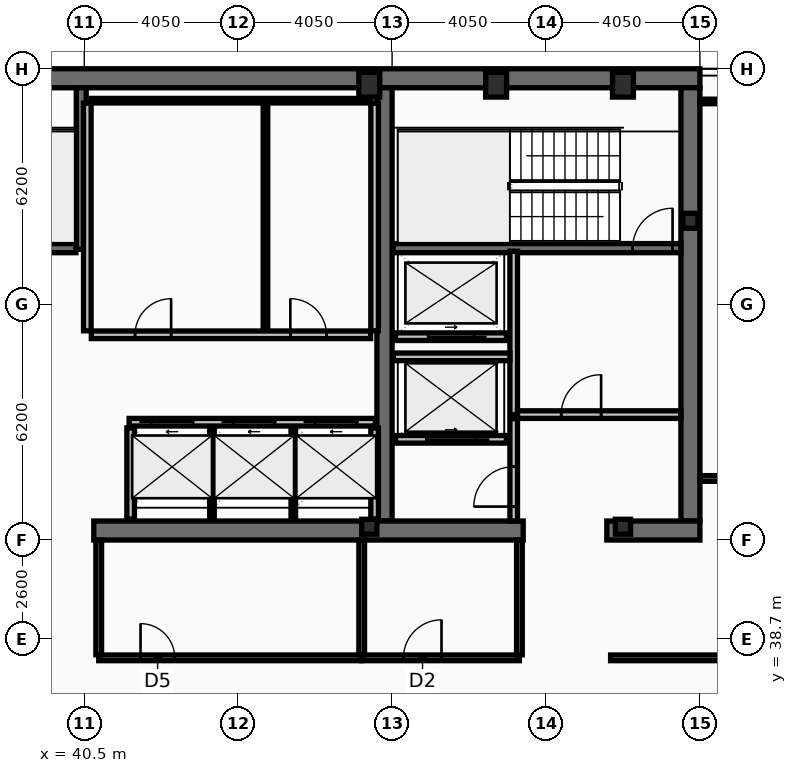
"""IFC4 building model, lengths in metres.
Left out: names, types, materials, properties, quantities, classifications, styles, units other than length and angle.
Written with IfcOpenShell. Run it as: python <this file> out.ifc"""

import sys

from ifc_helpers import new_model, si_unit, direction, frame, frame_2d, origin, origin_2d, place, context, subcontext, project, spatial, rectangle, hollow_rectangle, i_section, extrude, element, fill, save


model = new_model("IFC4")
c1 = context("Model", 3, precision=1e-05, world=origin(), true_north=direction((0.0, 1.0)))
c2 = subcontext(c1, "Body", "Model", "MODEL_VIEW")
j1 = project(units=[si_unit("LENGTHUNIT", "METRE"), si_unit("PLANEANGLEUNIT", "RADIAN")], contexts=[c1])
p1 = place(None, origin())
s1 = spatial("IfcSite", under=j1, at=p1, CompositionType="ELEMENT")
p2 = place(p1, origin())
s2 = spatial("IfcBuilding", under=s1, at=p2, CompositionType="ELEMENT")
p3 = place(p2, frame((0.0, 0.0, 329.0)))
s3 = spatial("IfcBuildingStorey", under=s2, at=p3, CompositionType="ELEMENT", Elevation=329.0)
p4 = place(p3, frame((16.2, 53.45, 0.0), z_axis=(0.0, 0.0, 1.0), x_axis=(1.0, 0.0, 0.0)))
e1 = element("IfcWall", 1, at=p4, inside=s3, PredefinedType="SHEAR", context=c2, shape_type="SweptSolid", body=[
    extrude(rectangle(XDim=40.5, YDim=0.5, at=frame_2d((20.25, 0.0))), origin(), (0.0, 0.0, 1.0), 3.44),
])
p5 = place(p3, frame((56.45, 53.2, 0.0), z_axis=(0.0, 0.0, 1.0), x_axis=(0.0, -1.0, 0.0)))
e2 = element("IfcWall", 2, at=p5, inside=s3, PredefinedType="SHEAR", context=c2, shape_type="SweptSolid", body=[
    extrude(rectangle(XDim=11.4, YDim=0.5, at=frame_2d((5.7, 0.0))), origin(), (0.0, 0.0, 1.0), 3.44),
])
p6 = place(p3, frame((48.4, 41.8, 0.0), z_axis=(0.0, 0.0, 1.0), x_axis=(0.0, 1.0, 0.0)))
e3 = element("IfcWall", 3, at=p6, inside=s3, PredefinedType="SHEAR", context=c2, shape_type="SweptSolid", body=[
    extrude(rectangle(XDim=11.4, YDim=0.4, at=frame_2d((5.7, 0.0))), origin(), (0.0, 0.0, 1.0), 3.44),
])
p7 = place(p3, frame((52.05, 41.55, 0.0), z_axis=(0.0, 0.0, 1.0), x_axis=(-1.0, 0.0, 0.0)))
e4 = element("IfcWall", 4, at=p7, inside=s3, PredefinedType="SHEAR", context=c2, shape_type="SweptSolid", body=[
    extrude(rectangle(XDim=11.3, YDim=0.5, at=frame_2d((5.65, 0.0))), origin(), (0.0, 0.0, 1.0), 3.44),
])
p8 = place(p3, frame((56.7, 41.55, 0.0), z_axis=(0.0, 0.0, 1.0), x_axis=(-1.0, 0.0, 0.0)))
e5 = element("IfcWall", 5, at=p8, inside=s3, PredefinedType="SHEAR", context=c2, shape_type="SweptSolid", body=[
    extrude(rectangle(XDim=2.45, YDim=0.5, at=frame_2d((1.225, 0.0))), origin(), (0.0, 0.0, 1.0), 3.44),
])
p9 = place(p3, frame((40.42, 48.95, 0.0), z_axis=(0.0, 0.0, 1.0), x_axis=(0.0, 1.0, 0.0)))
e6 = element("IfcWall", 6, at=p9, inside=s3, PredefinedType="SHEAR", context=c2, shape_type="SweptSolid", body=[
    extrude(rectangle(XDim=4.25, YDim=0.26, at=frame_2d((2.125, 0.0))), origin(), (0.0, 0.0, 1.0), 3.44),
])
p10 = place(p3, frame((48.63, 48.98, 0.0), z_axis=(0.0, 0.0, 1.0), x_axis=(1.0, 0.0, 0.0)))
e7 = element("IfcWall", 7, at=p10, inside=s3, PredefinedType="SHEAR", context=c2, shape_type="SweptSolid", body=[
    extrude(rectangle(XDim=7.57, YDim=0.24, at=frame_2d((3.785, 0.0))), origin(), (0.0, 0.0, 1.0), 3.44),
])
p11 = place(p10, frame((6.3, 0.0, 0.0)))
e8 = element("IfcOpeningElement", 8, at=p11, cuts=e7, PredefinedType="OPENING", context=c2, shape_type="SweptSolid", body=[
    extrude(rectangle(XDim=1.05, YDim=2.15, at=frame_2d((0.525, 1.075))), frame((0.0, 0.13, 0.0), z_axis=(0.0, -1.0, 0.0), x_axis=(1.0, 0.0, 0.0)), (0.0, 0.0, 1.0), 0.26),
])
p12 = place(p3, frame((32.72, 48.98, 0.0), z_axis=(0.0, 0.0, 1.0), x_axis=(1.0, 0.0, 0.0)))
e9 = element("IfcWall", 9, at=p12, inside=s3, PredefinedType="SHEAR", context=c2, shape_type="SweptSolid", body=[
    extrude(rectangle(XDim=7.56, YDim=0.24, at=frame_2d((3.78, 0.0))), origin(), (0.0, 0.0, 1.0), 3.44),
])
p13 = place(p12, frame((0.22, 0.0, 0.0)))
e10 = element("IfcOpeningElement", 10, at=p13, cuts=e9, PredefinedType="OPENING", context=c2, shape_type="SweptSolid", body=[
    extrude(rectangle(XDim=1.05, YDim=2.15, at=frame_2d((0.525, 1.075))), frame((0.0, 0.13, 0.0), z_axis=(0.0, -1.0, 0.0), x_axis=(1.0, 0.0, 0.0)), (0.0, 0.0, 1.0), 0.26),
])
for number, where, z_axis, x_axis in (
    (11, (48.0, 53.28, 0.0), (0.0, 0.0, 1.0), (1.0, 0.0, 0.0)),
    (12, (51.337, 53.28, 0.0), (0.0, 0.0, 1.0), (1.0, 0.0, 0.0)),
    (13, (54.675, 53.28, 0.0), (0.0, 0.0, 1.0), (1.0, 0.0, 0.0)),
):
    element("IfcColumn", number, at=place(p3, frame(where, z_axis=z_axis, x_axis=x_axis)), inside=s3, PredefinedType="COLUMN", context=c2, shape_type="SweptSolid", body=[
        extrude(hollow_rectangle(XDim=0.55, YDim=0.65, WallThickness=0.04, at=origin_2d()), origin(), (0.0, 0.0, 1.0), 3.6),
    ])
for number, where, z_axis, x_axis in (
    (14, (56.45, 49.7, 0.0), (0.0, 0.0, 1.0), (1.0, 0.0, 0.0)),
    (15, (48.0, 41.65, 0.0), (0.0, 0.0, 1.0), (1.0, 0.0, 0.0)),
    (16, (54.675, 41.65, 0.0), (0.0, 0.0, 1.0), (1.0, 0.0, 0.0)),
):
    element("IfcColumn", number, at=place(p3, frame(where, z_axis=z_axis, x_axis=x_axis)), inside=s3, PredefinedType="COLUMN", context=c2, shape_type="SweptSolid", body=[
        extrude(i_section(OverallWidth=0.399, OverallDepth=0.393, WebThickness=0.023, FlangeThickness=0.037, at=origin_2d()), origin(), (0.0, 0.0, 1.0), 3.6),
    ])
p14 = place(p3, frame((41.68, 44.4, 0.0), z_axis=(0.0, 0.0, 1.0), x_axis=(1.0, 0.0, 0.0)))
e17 = element("IfcWall", 17, at=p14, inside=s3, PredefinedType="PARTITIONING", context=c2, shape_type="SweptSolid", body=[
    extrude(rectangle(XDim=6.48, YDim=0.2, at=frame_2d((3.24, 0.0))), origin(), (0.0, 0.0, 1.0), 3.44),
])
p15 = place(p14, frame((0.58, 0.0, 0.0)))
e18 = element("IfcOpeningElement", 18, at=p15, cuts=e17, PredefinedType="OPENING", context=c2, shape_type="SweptSolid", body=[
    extrude(rectangle(XDim=1.1, YDim=2.18, at=frame_2d((0.55, 1.09))), frame((0.0, 0.11, 0.0), z_axis=(0.0, -1.0, 0.0), x_axis=(1.0, 0.0, 0.0)), (0.0, 0.0, 1.0), 0.22),
])
p16 = place(p14, frame((2.74, 0.0, 0.0)))
e19 = element("IfcOpeningElement", 19, at=p16, cuts=e17, PredefinedType="OPENING", context=c2, shape_type="SweptSolid", body=[
    extrude(rectangle(XDim=1.1, YDim=2.18, at=frame_2d((0.55, 1.09))), frame((0.0, 0.11, 0.0), z_axis=(0.0, -1.0, 0.0), x_axis=(1.0, 0.0, 0.0)), (0.0, 0.0, 1.0), 0.22),
])
p17 = place(p14, frame((4.9, 0.0, 0.0)))
e20 = element("IfcOpeningElement", 20, at=p17, cuts=e17, PredefinedType="OPENING", context=c2, shape_type="SweptSolid", body=[
    extrude(rectangle(XDim=1.1, YDim=2.18, at=frame_2d((0.55, 1.09))), frame((0.0, 0.11, 0.0), z_axis=(0.0, -1.0, 0.0), x_axis=(1.0, 0.0, 0.0)), (0.0, 0.0, 1.0), 0.22),
])
p18 = place(p3, frame((51.61, 43.95, 0.0), z_axis=(0.0, 0.0, 1.0), x_axis=(-1.0, 0.0, 0.0)))
e21 = element("IfcWall", 21, at=p18, inside=s3, PredefinedType="PARTITIONING", context=c2, shape_type="SweptSolid", body=[
    extrude(rectangle(XDim=2.92, YDim=0.2, at=frame_2d((1.46, 0.0))), origin(), (0.0, 0.0, 1.0), 3.44),
])
p19 = place(p18, frame((0.81, 0.0, 0.0)))
e22 = element("IfcOpeningElement", 22, at=p19, cuts=e21, PredefinedType="OPENING", context=c2, shape_type="SweptSolid", body=[
    extrude(rectangle(XDim=1.3, YDim=2.18, at=frame_2d((0.65, 1.09))), frame((0.0, 0.11, 0.0), z_axis=(0.0, -1.0, 0.0), x_axis=(1.0, 0.0, 0.0)), (0.0, 0.0, 1.0), 0.22),
])
p20 = place(p3, frame((51.61, 46.65, 0.0), z_axis=(0.0, 0.0, 1.0), x_axis=(-1.0, 0.0, 0.0)))
e23 = element("IfcWall", 23, at=p20, inside=s3, PredefinedType="PARTITIONING", context=c2, shape_type="SweptSolid", body=[
    extrude(rectangle(XDim=2.92, YDim=0.2, at=frame_2d((1.46, 0.0))), origin(), (0.0, 0.0, 1.0), 3.44),
])
p21 = place(p20, frame((0.86, 0.0, 0.0)))
e24 = element("IfcOpeningElement", 24, at=p21, cuts=e23, PredefinedType="OPENING", context=c2, shape_type="SweptSolid", body=[
    extrude(rectangle(XDim=1.2, YDim=2.18, at=frame_2d((0.6, 1.09))), frame((0.0, 0.11, 0.0), z_axis=(0.0, -1.0, 0.0), x_axis=(1.0, 0.0, 0.0)), (0.0, 0.0, 1.0), 0.22),
])
p22 = place(p3, frame((51.8, 44.6, 0.0), z_axis=(0.0, 0.0, 1.0), x_axis=(0.0, 1.0, 0.0)))
e25 = element("IfcWall", 25, at=p22, inside=s3, PredefinedType="PARTITIONING", context=c2, shape_type="SweptSolid", body=[
    extrude(rectangle(XDim=4.3, YDim=0.2, at=frame_2d((2.15, 0.0))), origin(), (0.0, 0.0, 1.0), 3.44),
])
p23 = place(p3, frame((51.9, 44.6, 0.0), z_axis=(0.0, 0.0, 1.0), x_axis=(1.0, 0.0, 0.0)))
e26 = element("IfcWall", 26, at=p23, inside=s3, PredefinedType="PARTITIONING", context=c2, shape_type="SweptSolid", body=[
    extrude(rectangle(XDim=4.3, YDim=0.2, at=frame_2d((2.15, 0.0))), origin(), (0.0, 0.0, 1.0), 3.44),
])
p24 = place(p23, frame((1.15, 0.0, 0.0)))
e27 = element("IfcOpeningElement", 27, at=p24, cuts=e26, PredefinedType="OPENING", context=c2, shape_type="SweptSolid", body=[
    extrude(rectangle(XDim=1.05, YDim=2.15, at=frame_2d((0.525, 1.075))), frame((0.0, 0.11, 0.0), z_axis=(0.0, -1.0, 0.0), x_axis=(1.0, 0.0, 0.0)), (0.0, 0.0, 1.0), 0.22),
])
p25 = place(p3, frame((48.63, 46.12, 0.0), z_axis=(0.0, 0.0, 1.0), x_axis=(1.0, 0.0, 0.0)))
e28 = element("IfcWall", 28, at=p25, inside=s3, PredefinedType="PARTITIONING", context=c2, shape_type="SweptSolid", body=[
    extrude(rectangle(XDim=3.07, YDim=0.2, at=frame_2d((1.535, 0.0))), origin(), (0.0, 0.0, 1.0), 3.44),
])
p26 = place(p3, frame((51.8, 41.8, 0.0), z_axis=(0.0, 0.0, 1.0), x_axis=(0.0, 1.0, 0.0)))
e29 = element("IfcWall", 29, at=p26, inside=s3, PredefinedType="PARTITIONING", context=c2, shape_type="SweptSolid", body=[
    extrude(rectangle(XDim=2.695, YDim=0.2, at=frame_2d((1.348, 0.0))), origin(), (0.0, 0.0, 1.0), 3.44),
])
p27 = place(p26, frame((0.38, 0.0, 0.0)))
e30 = element("IfcOpeningElement", 30, at=p27, cuts=e29, PredefinedType="OPENING", context=c2, shape_type="SweptSolid", body=[
    extrude(rectangle(XDim=1.05, YDim=2.15, at=frame_2d((0.525, 1.075))), frame((0.0, 0.11, 0.0), z_axis=(0.0, -1.0, 0.0), x_axis=(1.0, 0.0, 0.0)), (0.0, 0.0, 1.0), 0.22),
])
for number, where, z_axis, x_axis in (
    (31, (40.58, 46.805, 0.0), (0.0, 0.0, 1.0), (0.0, 1.0, 0.0)),
    (32, (48.14, 46.805, 0.0), (0.0, 0.0, 1.0), (0.0, 1.0, 0.0)),
):
    element("IfcWall", number, at=place(p3, frame(where, z_axis=z_axis, x_axis=x_axis)), inside=s3, PredefinedType="PARTITIONING", context=c2, shape_type="SweptSolid", body=[
        extrude(rectangle(XDim=5.99, YDim=0.2, at=frame_2d((2.995, 0.0))), origin(), (0.0, 0.0, 1.0), 3.44),
    ])
p28 = place(p3, frame((40.685, 52.86, 0.0), z_axis=(0.0, 0.0, 1.0), x_axis=(1.0, 0.0, 0.0)))
e33 = element("IfcWall", 33, at=p28, inside=s3, PredefinedType="PARTITIONING", context=c2, shape_type="SweptSolid", body=[
    extrude(rectangle(XDim=7.35, YDim=0.12, at=frame_2d((3.675, 0.0))), origin(), (0.0, 0.0, 1.0), 3.44),
])
p29 = place(p3, frame((45.267, 46.805, 0.0), z_axis=(0.0, 0.0, 1.0), x_axis=(0.0, 1.0, 0.0)))
e34 = element("IfcWall", 34, at=p29, inside=s3, PredefinedType="PARTITIONING", context=c2, shape_type="SweptSolid", body=[
    extrude(rectangle(XDim=5.99, YDim=0.12, at=frame_2d((2.995, 0.0))), origin(), (0.0, 0.0, 1.0), 3.44),
])
p30 = place(p3, frame((40.685, 46.7, 0.0), z_axis=(0.0, 0.0, 1.0), x_axis=(1.0, 0.0, 0.0)))
e35 = element("IfcWall", 35, at=p30, inside=s3, PredefinedType="PARTITIONING", context=c2, shape_type="SweptSolid", body=[
    extrude(rectangle(XDim=7.35, YDim=0.2, at=frame_2d((3.675, 0.0))), origin(), (0.0, 0.0, 1.0), 3.44),
])
p31 = place(p30, frame((1.15, 0.0, 0.0)))
e36 = element("IfcOpeningElement", 36, at=p31, cuts=e35, PredefinedType="OPENING", context=c2, shape_type="SweptSolid", body=[
    extrude(rectangle(XDim=0.95, YDim=2.1, at=frame_2d((0.475, 1.05))), frame((0.0, 0.11, 0.0), z_axis=(0.0, -1.0, 0.0), x_axis=(1.0, 0.0, 0.0)), (0.0, 0.0, 1.0), 0.22),
])
p32 = place(p30, frame((5.237, 0.0, 0.0)))
e37 = element("IfcOpeningElement", 37, at=p32, cuts=e35, PredefinedType="OPENING", context=c2, shape_type="SweptSolid", body=[
    extrude(rectangle(XDim=0.95, YDim=2.1, at=frame_2d((0.475, 1.05))), frame((0.0, 0.11, 0.0), z_axis=(0.0, -1.0, 0.0), x_axis=(1.0, 0.0, 0.0)), (0.0, 0.0, 1.0), 0.22),
])
for number, where, z_axis, x_axis in (
    (38, (41.72, 41.85, 0.0), (0.0, 0.0, 1.0), (0.0, 1.0, 0.0)),
    (39, (48.14, 41.85, 0.0), (0.0, 0.0, 1.0), (0.0, 1.0, 0.0)),
):
    element("IfcWall", number, at=place(p3, frame(where, z_axis=z_axis, x_axis=x_axis)), inside=s3, PredefinedType="PARTITIONING", context=c2, shape_type="SweptSolid", body=[
        extrude(rectangle(XDim=2.4, YDim=0.2, at=frame_2d((1.2, 0.0))), origin(), (0.0, 0.0, 1.0), 3.44),
    ])
for number, where, z_axis, x_axis in (
    (40, (43.86, 41.85, 0.0), (0.0, 0.0, 1.0), (0.0, 1.0, 0.0)),
    (41, (46.0, 41.85, 0.0), (0.0, 0.0, 1.0), (0.0, 1.0, 0.0)),
):
    element("IfcWall", number, at=place(p3, frame(where, z_axis=z_axis, x_axis=x_axis)), inside=s3, PredefinedType="PARTITIONING", context=c2, shape_type="SweptSolid", body=[
        extrude(rectangle(XDim=2.4, YDim=0.12, at=frame_2d((1.2, 0.0))), origin(), (0.0, 0.0, 1.0), 3.44),
    ])
p33 = place(p3, frame((40.88, 38.2, 0.0), z_axis=(0.0, 0.0, 1.0), x_axis=(1.0, 0.0, 0.0)))
e42 = element("IfcWall", 42, at=p33, inside=s3, PredefinedType="PARTITIONING", context=c2, shape_type="SweptSolid", body=[
    extrude(rectangle(XDim=6.92, YDim=0.15, at=frame_2d((3.46, 0.0))), origin(), (0.0, 0.0, 1.0), 2.83),
])
p34 = place(p33, frame((1.1, 0.0, 0.0)))
e43 = element("IfcOpeningElement", 43, at=p34, cuts=e42, PredefinedType="OPENING", context=c2, shape_type="SweptSolid", body=[
    extrude(rectangle(XDim=0.9, YDim=2.05, at=frame_2d((0.45, 1.025))), frame((0.0, 0.085, 0.0), z_axis=(0.0, -1.0, 0.0), x_axis=(1.0, 0.0, 0.0)), (0.0, 0.0, 1.0), 0.17),
])
p35 = place(p3, frame((47.8, 38.2, 0.0), z_axis=(0.0, 0.0, 1.0), x_axis=(1.0, 0.0, 0.0)))
e44 = element("IfcWall", 44, at=p35, inside=s3, PredefinedType="PARTITIONING", context=c2, shape_type="SweptSolid", body=[
    extrude(rectangle(XDim=4.15, YDim=0.15, at=frame_2d((2.075, 0.0))), origin(), (0.0, 0.0, 1.0), 2.83),
])
p36 = place(p35, frame((1.1, 0.0, 0.0)))
e45 = element("IfcOpeningElement", 45, at=p36, cuts=e44, PredefinedType="OPENING", context=c2, shape_type="SweptSolid", body=[
    extrude(rectangle(XDim=1.0, YDim=2.05, at=frame_2d((0.5, 1.025))), frame((0.0, 0.085, 0.0), z_axis=(0.0, -1.0, 0.0), x_axis=(1.0, 0.0, 0.0)), (0.0, 0.0, 1.0), 0.17),
])
p37 = place(p3, frame((40.88, 38.28, 0.0), z_axis=(0.0, 0.0, 1.0), x_axis=(0.0, 1.0, 0.0)))
e46 = element("IfcWall", 46, at=p37, inside=s3, PredefinedType="PARTITIONING", context=c2, shape_type="SweptSolid", body=[
    extrude(rectangle(XDim=3.02, YDim=0.15, at=frame_2d((1.51, 0.0))), origin(), (0.0, 0.0, 1.0), 3.44),
])
p38 = place(p3, frame((47.8, 38.28, 0.0), z_axis=(0.0, 0.0, 1.0), x_axis=(0.0, 1.0, 0.0)))
e47 = element("IfcWall", 47, at=p38, inside=s3, PredefinedType="PARTITIONING", context=c2, shape_type="SweptSolid", body=[
    extrude(rectangle(XDim=3.02, YDim=0.15, at=frame_2d((1.51, 0.0))), origin(), (0.0, 0.0, 1.0), 2.83),
])
p39 = place(p3, frame((51.95, 38.28, 0.0), z_axis=(0.0, 0.0, 1.0), x_axis=(0.0, 1.0, 0.0)))
e48 = element("IfcWall", 48, at=p39, inside=s3, PredefinedType="PARTITIONING", context=c2, shape_type="SweptSolid", body=[
    extrude(rectangle(XDim=3.02, YDim=0.15, at=frame_2d((1.51, 0.0))), origin(), (0.0, 0.0, 1.0), 3.44),
])
p40 = place(p3, frame((54.35, 38.2, 0.0), z_axis=(0.0, 0.0, 1.0), x_axis=(1.0, 0.0, 0.0)))
e49 = element("IfcWall", 49, at=p40, inside=s3, PredefinedType="PARTITIONING", context=c2, shape_type="SweptSolid", body=[
    extrude(rectangle(XDim=6.52, YDim=0.15, at=frame_2d((3.26, 0.0))), origin(), (0.0, 0.0, 1.0), 2.83),
])
p41 = place(p40, frame((3.25, 0.0, 0.0)))
e50 = element("IfcOpeningElement", 50, at=p41, cuts=e49, PredefinedType="OPENING", context=c2, shape_type="SweptSolid", body=[
    extrude(rectangle(XDim=0.95, YDim=2.05, at=frame_2d((0.475, 1.025))), frame((0.0, 0.085, 0.0), z_axis=(0.0, -1.0, 0.0), x_axis=(1.0, 0.0, 0.0)), (0.0, 0.0, 1.0), 0.17),
])
p42 = place(p3, frame((56.7, 42.92, 0.0), z_axis=(0.0, 0.0, 1.0), x_axis=(1.0, 0.0, 0.0)))
e51 = element("IfcWall", 51, at=p42, inside=s3, PredefinedType="PARTITIONING", context=c2, shape_type="SweptSolid", body=[
    extrude(rectangle(XDim=4.105, YDim=0.15, at=frame_2d((2.052, 0.0))), origin(), (0.0, 0.0, 1.0), 2.83),
])
p43 = place(p42, frame((0.9, 0.0, 0.0)))
e52 = element("IfcOpeningElement", 52, at=p43, cuts=e51, PredefinedType="OPENING", context=c2, shape_type="SweptSolid", body=[
    extrude(rectangle(XDim=0.9, YDim=2.05, at=frame_2d((0.45, 1.025))), frame((0.0, 0.085, 0.0), z_axis=(0.0, -1.0, 0.0), x_axis=(1.0, 0.0, 0.0)), (0.0, 0.0, 1.0), 0.17),
])
p44 = place(p3, frame((56.7, 52.84, 0.0), z_axis=(0.0, 0.0, 1.0), x_axis=(1.0, 0.0, 0.0)))
e53 = element("IfcWall", 53, at=p44, inside=s3, PredefinedType="PARTITIONING", context=c2, shape_type="SweptSolid", body=[
    extrude(rectangle(XDim=4.105, YDim=0.12, at=frame_2d((2.052, 0.0))), origin(), (0.0, 0.0, 1.0), 3.44),
])
p45 = place(p11, origin())
e54 = element("IfcDoor", 54, at=p45, inside=s3, OperationType="SINGLE_SWING_RIGHT", PredefinedType="DOOR", context=c2, shape_type="SweptSolid", body=[
    extrude(rectangle(XDim=1.05, YDim=2.15, at=frame_2d((0.525, 1.075))), frame((0.0, 0.025, 0.0), z_axis=(0.0, -1.0, 0.0), x_axis=(1.0, 0.0, 0.0)), (0.0, 0.0, 1.0), 0.05),
])
fill(e8, e54)
p46 = place(p15, origin())
e55 = element("IfcDoor", 55, at=p46, inside=s3, OperationType="SLIDING_TO_LEFT", PredefinedType="DOOR", context=c2, shape_type="SweptSolid", body=[
    extrude(rectangle(XDim=1.1, YDim=2.18, at=frame_2d((0.55, 1.09))), frame((0.0, 0.025, 0.0), z_axis=(0.0, -1.0, 0.0), x_axis=(1.0, 0.0, 0.0)), (0.0, 0.0, 1.0), 0.05),
])
fill(e18, e55)
p47 = place(p16, origin())
e56 = element("IfcDoor", 56, at=p47, inside=s3, OperationType="SLIDING_TO_LEFT", PredefinedType="DOOR", context=c2, shape_type="SweptSolid", body=[
    extrude(rectangle(XDim=1.1, YDim=2.18, at=frame_2d((0.55, 1.09))), frame((0.0, 0.025, 0.0), z_axis=(0.0, -1.0, 0.0), x_axis=(1.0, 0.0, 0.0)), (0.0, 0.0, 1.0), 0.05),
])
fill(e19, e56)
p48 = place(p17, origin())
e57 = element("IfcDoor", 57, at=p48, inside=s3, OperationType="SLIDING_TO_LEFT", PredefinedType="DOOR", context=c2, shape_type="SweptSolid", body=[
    extrude(rectangle(XDim=1.1, YDim=2.18, at=frame_2d((0.55, 1.09))), frame((0.0, 0.025, 0.0), z_axis=(0.0, -1.0, 0.0), x_axis=(1.0, 0.0, 0.0)), (0.0, 0.0, 1.0), 0.05),
])
fill(e20, e57)
p49 = place(p19, origin())
e58 = element("IfcDoor", 58, at=p49, inside=s3, OperationType="SLIDING_TO_LEFT", PredefinedType="DOOR", context=c2, shape_type="SweptSolid", body=[
    extrude(rectangle(XDim=1.3, YDim=2.18, at=frame_2d((0.65, 1.09))), frame((0.0, 0.025, 0.0), z_axis=(0.0, -1.0, 0.0), x_axis=(1.0, 0.0, 0.0)), (0.0, 0.0, 1.0), 0.05),
])
fill(e22, e58)
p50 = place(p21, origin())
e59 = element("IfcDoor", 59, at=p50, inside=s3, OperationType="SLIDING_TO_LEFT", PredefinedType="DOOR", context=c2, shape_type="SweptSolid", body=[
    extrude(rectangle(XDim=1.2, YDim=2.18, at=frame_2d((0.6, 1.09))), frame((0.0, 0.025, 0.0), z_axis=(0.0, -1.0, 0.0), x_axis=(1.0, 0.0, 0.0)), (0.0, 0.0, 1.0), 0.05),
])
fill(e24, e59)
p51 = place(p24, origin())
e60 = element("IfcDoor", 60, at=p51, inside=s3, OperationType="SINGLE_SWING_RIGHT", PredefinedType="DOOR", context=c2, shape_type="SweptSolid", body=[
    extrude(rectangle(XDim=1.05, YDim=2.15, at=frame_2d((0.525, 1.075))), frame((0.0, 0.025, 0.0), z_axis=(0.0, -1.0, 0.0), x_axis=(1.0, 0.0, 0.0)), (0.0, 0.0, 1.0), 0.05),
])
fill(e27, e60)
p52 = place(p27, origin())
e61 = element("IfcDoor", 61, at=p52, inside=s3, OperationType="SINGLE_SWING_LEFT", PredefinedType="DOOR", context=c2, shape_type="SweptSolid", body=[
    extrude(rectangle(XDim=1.05, YDim=2.15, at=frame_2d((0.525, 1.075))), frame((0.0, 0.025, 0.0), z_axis=(0.0, -1.0, 0.0), x_axis=(1.0, 0.0, 0.0)), (0.0, 0.0, 1.0), 0.05),
])
fill(e30, e61)
p53 = place(p31, origin())
e62 = element("IfcDoor", 62, at=p53, inside=s3, OperationType="SINGLE_SWING_RIGHT", PredefinedType="DOOR", context=c2, shape_type="SweptSolid", body=[
    extrude(rectangle(XDim=0.95, YDim=2.1, at=frame_2d((0.475, 1.05))), frame((0.0, 0.025, 0.0), z_axis=(0.0, -1.0, 0.0), x_axis=(1.0, 0.0, 0.0)), (0.0, 0.0, 1.0), 0.05),
])
fill(e36, e62)
p54 = place(p32, origin())
e63 = element("IfcDoor", 63, at=p54, inside=s3, OperationType="SINGLE_SWING_LEFT", PredefinedType="DOOR", context=c2, shape_type="SweptSolid", body=[
    extrude(rectangle(XDim=0.95, YDim=2.1, at=frame_2d((0.475, 1.05))), frame((0.0, 0.025, 0.0), z_axis=(0.0, -1.0, 0.0), x_axis=(1.0, 0.0, 0.0)), (0.0, 0.0, 1.0), 0.05),
])
fill(e37, e63)
p55 = place(p34, origin())
e64 = element("IfcDoor", 64, at=p55, inside=s3, OperationType="SINGLE_SWING_LEFT", PredefinedType="DOOR", context=c2, shape_type="SweptSolid", body=[
    extrude(rectangle(XDim=0.9, YDim=2.05, at=frame_2d((0.45, 1.025))), frame((0.0, 0.025, 0.0), z_axis=(0.0, -1.0, 0.0), x_axis=(1.0, 0.0, 0.0)), (0.0, 0.0, 1.0), 0.05),
])
fill(e43, e64)
p56 = place(p36, origin())
e65 = element("IfcDoor", 65, at=p56, inside=s3, OperationType="SINGLE_SWING_RIGHT", PredefinedType="DOOR", context=c2, shape_type="SweptSolid", body=[
    extrude(rectangle(XDim=1.0, YDim=2.05, at=frame_2d((0.5, 1.025))), frame((0.0, 0.025, 0.0), z_axis=(0.0, -1.0, 0.0), x_axis=(1.0, 0.0, 0.0)), (0.0, 0.0, 1.0), 0.05),
])
fill(e45, e65)
save(model, sys.argv[1])
